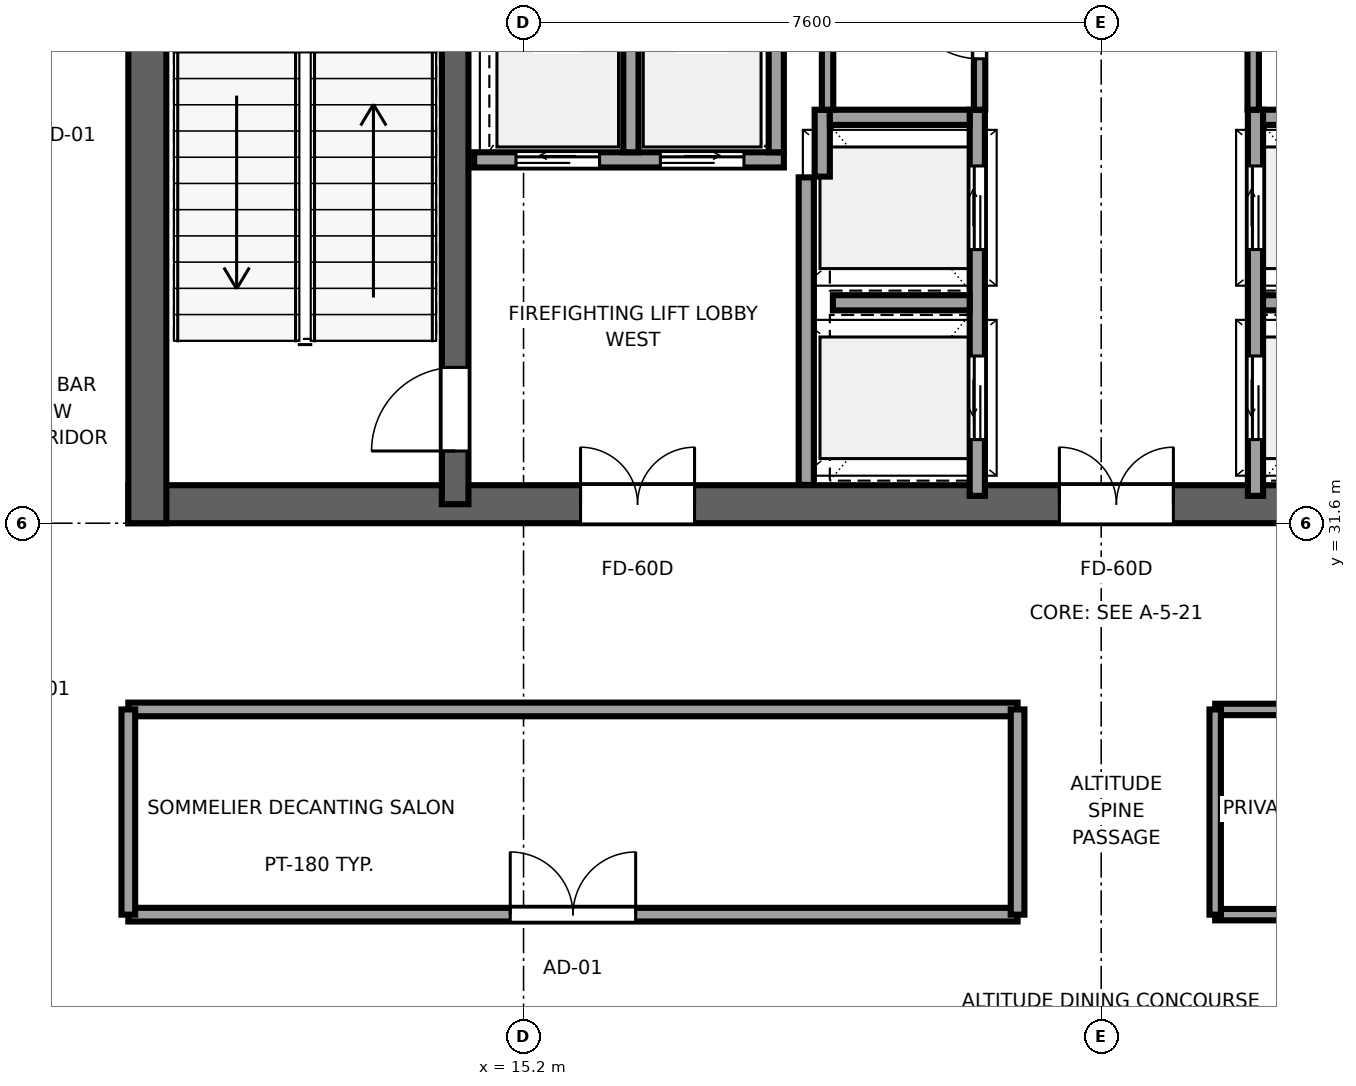
"""IFC4 building model, lengths in metres.
Left out: names, types, materials, properties, quantities, classifications, styles, units other than length and angle.
Written with IfcOpenShell. Run it as: python <this file> out.ifc"""

import sys

from ifc_helpers import new_model, si_unit, direction, frame, frame_2d, origin, place, context, subcontext, project, spatial, rectangle, extrude, source, transform, mapped, element, fill, save


model = new_model("IFC4")
c1 = context("Model", 3, precision=1e-05, world=origin(), true_north=direction((0.0, 1.0)))
c2 = subcontext(c1, "Body", "Model", "MODEL_VIEW")
j1 = project(units=[si_unit("LENGTHUNIT", "METRE"), si_unit("PLANEANGLEUNIT", "RADIAN")], contexts=[c1])
p1 = place(None, origin())
s1 = spatial("IfcSite", under=j1, at=p1, CompositionType="ELEMENT")
p2 = place(p1, origin())
s2 = spatial("IfcBuilding", under=s1, at=p2, CompositionType="ELEMENT")
p3 = place(p2, frame((0.0, 0.0, 286.55)))
s3 = spatial("IfcBuildingStorey", under=s2, at=p3, CompositionType="ELEMENT", Elevation=286.55)
p4 = place(p3, frame((10.0, 31.85, 0.0), z_axis=(0.0, 0.0, 1.0), x_axis=(1.0, 0.0, 0.0)))
e1 = element("IfcWall", 1, at=p4, inside=s3, PredefinedType="SHEAR", context=c2, shape_type="SweptSolid", body=[
    extrude(rectangle(XDim=26.0, YDim=0.5, at=frame_2d((13.0, 0.0))), origin(), (0.0, 0.0, 1.0), 4.4),
])
p5 = place(p4, frame((7.45, 0.0, 0.0), z_axis=(0.0, 0.0, 1.0), x_axis=(-1.0, 0.0, 0.0)))
e2 = element("IfcOpeningElement", 2, at=p5, cuts=e1, PredefinedType="OPENING", context=c2, shape_type="SweptSolid", body=[
    extrude(rectangle(XDim=1.5, YDim=2.04, at=frame_2d((0.75, 1.02))), frame((0.0, 0.26, 0.0), z_axis=(0.0, -1.0, 0.0), x_axis=(1.0, 0.0, 0.0)), (0.0, 0.0, 1.0), 0.52),
])
p6 = place(p4, frame((13.75, 0.0, 0.0), z_axis=(0.0, 0.0, 1.0), x_axis=(-1.0, 0.0, 0.0)))
e3 = element("IfcOpeningElement", 3, at=p6, cuts=e1, PredefinedType="OPENING", context=c2, shape_type="SweptSolid", body=[
    extrude(rectangle(XDim=1.5, YDim=2.04, at=frame_2d((0.75, 1.02))), frame((0.0, 0.26, 0.0), z_axis=(0.0, -1.0, 0.0), x_axis=(1.0, 0.0, 0.0)), (0.0, 0.0, 1.0), 0.52),
])
p7 = place(p4, frame((20.05, 0.0, 0.0), z_axis=(0.0, 0.0, 1.0), x_axis=(-1.0, 0.0, 0.0)))
e4 = element("IfcOpeningElement", 4, at=p7, cuts=e1, PredefinedType="OPENING", context=c2, shape_type="SweptSolid", body=[
    extrude(rectangle(XDim=1.5, YDim=2.04, at=frame_2d((0.75, 1.02))), frame((0.0, 0.26, 0.0), z_axis=(0.0, -1.0, 0.0), x_axis=(1.0, 0.0, 0.0)), (0.0, 0.0, 1.0), 0.52),
])
p8 = place(p3, frame((10.25, 31.6, 0.0), z_axis=(0.0, 0.0, 1.0), x_axis=(0.0, 1.0, 0.0)))
e5 = element("IfcWall", 5, at=p8, inside=s3, PredefinedType="SHEAR", context=c2, shape_type="SweptSolid", body=[
    extrude(rectangle(XDim=13.6, YDim=0.5, at=frame_2d((6.8, 0.0))), origin(), (0.0, 0.0, 1.0), 4.4),
])
p9 = place(p3, frame((14.3, 31.85, 0.0), z_axis=(0.0, 0.0, 1.0), x_axis=(0.0, 1.0, 0.0)))
e6 = element("IfcWall", 6, at=p9, inside=s3, PredefinedType="SHEAR", context=c2, shape_type="SweptSolid", body=[
    extrude(rectangle(XDim=13.1, YDim=0.35, at=frame_2d((6.55, 0.0))), origin(), (0.0, 0.0, 1.0), 4.4),
])
p10 = place(p9, frame((0.7, 0.0, 0.0)))
e7 = element("IfcOpeningElement", 7, at=p10, cuts=e6, PredefinedType="OPENING", context=c2, shape_type="SweptSolid", body=[
    extrude(rectangle(XDim=1.1, YDim=2.12, at=frame_2d((0.55, 1.06))), frame((0.0, 0.185, 0.0), z_axis=(0.0, -1.0, 0.0), x_axis=(1.0, 0.0, 0.0)), (0.0, 0.0, 1.0), 0.37),
])
p11 = place(p3, frame((18.92, 32.104, 0.0), z_axis=(0.0, 0.0, 1.0), x_axis=(0.0, 1.0, 0.0)))
e8 = element("IfcWall", 8, at=p11, inside=s3, PredefinedType="SOLIDWALL", context=c2, shape_type="SweptSolid", body=[
    extrude(rectangle(XDim=4.046, YDim=0.2, at=frame_2d((2.023, 0.0))), origin(), (0.0, 0.0, 1.0), 4.14),
])
p12 = place(p3, frame((21.17, 31.96, 0.0), z_axis=(0.0, 0.0, 1.0), x_axis=(0.0, 1.0, 0.0)))
e9 = element("IfcWall", 9, at=p12, inside=s3, PredefinedType="SOLIDWALL", context=c2, shape_type="SweptSolid", body=[
    extrude(rectangle(XDim=5.08, YDim=0.2, at=frame_2d((2.54, 0.0))), origin(), (0.0, 0.0, 1.0), 4.14),
])
p13 = place(p12, frame((0.74, 0.0, 0.0)))
e10 = element("IfcOpeningElement", 10, at=p13, cuts=e9, PredefinedType="OPENING", context=c2, shape_type="SweptSolid", body=[
    extrude(rectangle(XDim=1.1, YDim=2.12, at=frame_2d((0.55, 1.06))), frame((0.0, 0.11, 0.0), z_axis=(0.0, -1.0, 0.0), x_axis=(1.0, 0.0, 0.0)), (0.0, 0.0, 1.0), 0.22),
])
p14 = place(p12, frame((3.24, 0.0, 0.0)))
e11 = element("IfcOpeningElement", 11, at=p14, cuts=e9, PredefinedType="OPENING", context=c2, shape_type="SweptSolid", body=[
    extrude(rectangle(XDim=1.1, YDim=2.12, at=frame_2d((0.55, 1.06))), frame((0.0, 0.11, 0.0), z_axis=(0.0, -1.0, 0.0), x_axis=(1.0, 0.0, 0.0)), (0.0, 0.0, 1.0), 0.22),
])
p15 = place(p3, frame((19.13, 36.16, 0.0), z_axis=(0.0, 0.0, 1.0), x_axis=(0.0, 1.0, 0.0)))
e12 = element("IfcWall", 12, at=p15, inside=s3, PredefinedType="SOLIDWALL", context=c2, shape_type="SweptSolid", body=[
    extrude(rectangle(XDim=0.88, YDim=0.2, at=frame_2d((0.44, 0.0))), origin(), (0.0, 0.0, 1.0), 4.14),
])
p16 = place(p3, frame((19.23, 36.94, 0.0), z_axis=(0.0, 0.0, 1.0), x_axis=(1.0, 0.0, 0.0)))
e13 = element("IfcWall", 13, at=p16, inside=s3, PredefinedType="SOLIDWALL", context=c2, shape_type="SweptSolid", body=[
    extrude(rectangle(XDim=1.84, YDim=0.2, at=frame_2d((0.92, 0.0))), origin(), (0.0, 0.0, 1.0), 4.14),
])
p17 = place(p3, frame((19.27, 34.5, 0.0), z_axis=(0.0, 0.0, 1.0), x_axis=(1.0, 0.0, 0.0)))
e14 = element("IfcWall", 14, at=p17, inside=s3, PredefinedType="SOLIDWALL", context=c2, shape_type="SweptSolid", body=[
    extrude(rectangle(XDim=1.8, YDim=0.2, at=frame_2d((0.9, 0.0))), origin(), (0.0, 0.0, 1.0), 4.14),
])
p18 = place(p3, frame((14.55, 36.38, 0.0), z_axis=(0.0, 0.0, 1.0), x_axis=(1.0, 0.0, 0.0)))
e15 = element("IfcWall", 15, at=p18, inside=s3, PredefinedType="SOLIDWALL", context=c2, shape_type="SweptSolid", body=[
    extrude(rectangle(XDim=4.075, YDim=0.2, at=frame_2d((2.038, 0.0))), origin(), (0.0, 0.0, 1.0), 4.14),
])
p19 = place(p18, frame((0.55, 0.0, 0.0)))
e16 = element("IfcOpeningElement", 16, at=p19, cuts=e15, PredefinedType="OPENING", context=c2, shape_type="SweptSolid", body=[
    extrude(rectangle(XDim=1.1, YDim=2.12, at=frame_2d((0.55, 1.06))), frame((0.0, 0.11, 0.0), z_axis=(0.0, -1.0, 0.0), x_axis=(1.0, 0.0, 0.0)), (0.0, 0.0, 1.0), 0.22),
])
p20 = place(p18, frame((2.45, 0.0, 0.0)))
e17 = element("IfcOpeningElement", 17, at=p20, cuts=e15, PredefinedType="OPENING", context=c2, shape_type="SweptSolid", body=[
    extrude(rectangle(XDim=1.1, YDim=2.12, at=frame_2d((0.55, 1.06))), frame((0.0, 0.11, 0.0), z_axis=(0.0, -1.0, 0.0), x_axis=(1.0, 0.0, 0.0)), (0.0, 0.0, 1.0), 0.22),
])
for number, where, z_axis, x_axis in (
    (18, (18.525, 36.48, 0.0), (0.0, 0.0, 1.0), (0.0, 1.0, 0.0)),
    (19, (16.613, 36.48, 0.0), (0.0, 0.0, 1.0), (0.0, 1.0, 0.0)),
):
    element("IfcWall", number, at=place(p3, frame(where, z_axis=z_axis, x_axis=x_axis)), inside=s3, PredefinedType="SOLIDWALL", context=c2, shape_type="SweptSolid", body=[
        extrude(rectangle(XDim=2.54, YDim=0.2, at=frame_2d((1.27, 0.0))), origin(), (0.0, 0.0, 1.0), 4.14),
    ])
p21 = place(p3, frame((24.83, 31.96, 0.0), z_axis=(0.0, 0.0, 1.0), x_axis=(0.0, 1.0, 0.0)))
e20 = element("IfcWall", 20, at=p21, inside=s3, PredefinedType="SOLIDWALL", context=c2, shape_type="SweptSolid", body=[
    extrude(rectangle(XDim=5.08, YDim=0.2, at=frame_2d((2.54, 0.0))), origin(), (0.0, 0.0, 1.0), 4.14),
])
p22 = place(p21, frame((0.74, 0.0, 0.0)))
e21 = element("IfcOpeningElement", 21, at=p22, cuts=e20, PredefinedType="OPENING", context=c2, shape_type="SweptSolid", body=[
    extrude(rectangle(XDim=1.1, YDim=2.12, at=frame_2d((0.55, 1.06))), frame((0.0, 0.11, 0.0), z_axis=(0.0, -1.0, 0.0), x_axis=(1.0, 0.0, 0.0)), (0.0, 0.0, 1.0), 0.22),
])
p23 = place(p21, frame((3.24, 0.0, 0.0)))
e22 = element("IfcOpeningElement", 22, at=p23, cuts=e20, PredefinedType="OPENING", context=c2, shape_type="SweptSolid", body=[
    extrude(rectangle(XDim=1.1, YDim=2.12, at=frame_2d((0.55, 1.06))), frame((0.0, 0.11, 0.0), z_axis=(0.0, -1.0, 0.0), x_axis=(1.0, 0.0, 0.0)), (0.0, 0.0, 1.0), 0.22),
])
p24 = place(p3, frame((24.93, 36.94, 0.0), z_axis=(0.0, 0.0, 1.0), x_axis=(1.0, 0.0, 0.0)))
e23 = element("IfcWall", 23, at=p24, inside=s3, PredefinedType="SOLIDWALL", context=c2, shape_type="SweptSolid", body=[
    extrude(rectangle(XDim=1.84, YDim=0.2, at=frame_2d((0.92, 0.0))), origin(), (0.0, 0.0, 1.0), 4.14),
])
p25 = place(p3, frame((24.93, 34.5, 0.0), z_axis=(0.0, 0.0, 1.0), x_axis=(1.0, 0.0, 0.0)))
e24 = element("IfcWall", 24, at=p25, inside=s3, PredefinedType="SOLIDWALL", context=c2, shape_type="SweptSolid", body=[
    extrude(rectangle(XDim=1.8, YDim=0.2, at=frame_2d((0.9, 0.0))), origin(), (0.0, 0.0, 1.0), 4.14),
])
p26 = place(p3, frame((19.2, 37.04, 0.0), z_axis=(0.0, 0.0, 1.0), x_axis=(0.0, 1.0, 0.0)))
e25 = element("IfcWall", 25, at=p26, inside=s3, PredefinedType="PARTITIONING", context=c2, shape_type="SweptSolid", body=[
    extrude(rectangle(XDim=2.36, YDim=0.15, at=frame_2d((1.18, 0.0))), origin(), (0.0, 0.0, 1.0), 4.14),
])
p27 = place(p3, frame((21.2, 37.04, 0.0), z_axis=(0.0, 0.0, 1.0), x_axis=(0.0, 1.0, 0.0)))
e26 = element("IfcWall", 26, at=p27, inside=s3, PredefinedType="PARTITIONING", context=c2, shape_type="SweptSolid", body=[
    extrude(rectangle(XDim=2.36, YDim=0.15, at=frame_2d((1.18, 0.0))), origin(), (0.0, 0.0, 1.0), 4.14),
])
p28 = place(p27, frame((0.67, 0.0, 0.0)))
e27 = element("IfcOpeningElement", 27, at=p28, cuts=e26, PredefinedType="OPENING", context=c2, shape_type="SweptSolid", body=[
    extrude(rectangle(XDim=1.02, YDim=2.03, at=frame_2d((0.51, 1.015))), frame((0.0, 0.085, 0.0), z_axis=(0.0, -1.0, 0.0), x_axis=(1.0, 0.0, 0.0)), (0.0, 0.0, 1.0), 0.17),
])
p29 = place(p3, frame((24.8, 37.04, 0.0), z_axis=(0.0, 0.0, 1.0), x_axis=(0.0, 1.0, 0.0)))
e28 = element("IfcWall", 28, at=p29, inside=s3, PredefinedType="PARTITIONING", context=c2, shape_type="SweptSolid", body=[
    extrude(rectangle(XDim=4.86, YDim=0.15, at=frame_2d((2.43, 0.0))), origin(), (0.0, 0.0, 1.0), 4.14),
])
p30 = place(p29, frame((2.02, 0.0, 0.0)))
e29 = element("IfcOpeningElement", 29, at=p30, cuts=e28, PredefinedType="OPENING", context=c2, shape_type="SweptSolid", body=[
    extrude(rectangle(XDim=0.82, YDim=2.01, at=frame_2d((0.41, 1.005))), frame((0.0, 0.085, 0.0), z_axis=(0.0, -1.0, 0.0), x_axis=(1.0, 0.0, 0.0)), (0.0, 0.0, 1.0), 0.17),
])
p31 = place(p3, frame((10.0, 26.45, 0.0), z_axis=(0.0, 0.0, 1.0), x_axis=(1.0, 0.0, 0.0)))
e30 = element("IfcWall", 30, at=p31, inside=s3, PredefinedType="PARTITIONING", context=c2, shape_type="SweptSolid", body=[
    extrude(rectangle(XDim=11.7, YDim=0.18, at=frame_2d((5.85, 0.0))), origin(), (0.0, 0.0, 1.0), 4.14),
])
p32 = place(p31, frame((5.025, 0.0, 0.0)))
e31 = element("IfcOpeningElement", 31, at=p32, cuts=e30, PredefinedType="OPENING", context=c2, shape_type="SweptSolid", body=[
    extrude(rectangle(XDim=1.65, YDim=2.15, at=frame_2d((0.825, 1.075))), frame((0.0, 0.1, 0.0), z_axis=(0.0, -1.0, 0.0), x_axis=(1.0, 0.0, 0.0)), (0.0, 0.0, 1.0), 0.2),
])
p33 = place(p3, frame((10.0, 29.15, 0.0), z_axis=(0.0, 0.0, 1.0), x_axis=(1.0, 0.0, 0.0)))
e32 = element("IfcWall", 32, at=p33, inside=s3, PredefinedType="PARTITIONING", context=c2, shape_type="SweptSolid", body=[
    extrude(rectangle(XDim=11.7, YDim=0.18, at=frame_2d((5.85, 0.0))), origin(), (0.0, 0.0, 1.0), 4.14),
])
for number, where, z_axis, x_axis in (
    (33, (10.0, 26.45, 0.0), (0.0, 0.0, 1.0), (0.0, 1.0, 0.0)),
    (34, (21.7, 26.45, 0.0), (0.0, 0.0, 1.0), (0.0, 1.0, 0.0)),
):
    element("IfcWall", number, at=place(p3, frame(where, z_axis=z_axis, x_axis=x_axis)), inside=s3, PredefinedType="PARTITIONING", context=c2, shape_type="SweptSolid", body=[
        extrude(rectangle(XDim=2.7, YDim=0.18, at=frame_2d((1.35, 0.0))), origin(), (0.0, 0.0, 1.0), 4.14),
    ])
p34 = place(p3, frame((24.3, 26.45, 0.0), z_axis=(0.0, 0.0, 1.0), x_axis=(1.0, 0.0, 0.0)))
e35 = element("IfcWall", 35, at=p34, inside=s3, PredefinedType="PARTITIONING", context=c2, shape_type="SweptSolid", body=[
    extrude(rectangle(XDim=11.55, YDim=0.15, at=frame_2d((5.775, 0.0))), origin(), (0.0, 0.0, 1.0), 4.14),
])
p35 = place(p34, frame((4.95, 0.0, 0.0)))
e36 = element("IfcOpeningElement", 36, at=p35, cuts=e35, PredefinedType="OPENING", context=c2, shape_type="SweptSolid", body=[
    extrude(rectangle(XDim=1.65, YDim=2.15, at=frame_2d((0.825, 1.075))), frame((0.0, 0.085, 0.0), z_axis=(0.0, -1.0, 0.0), x_axis=(1.0, 0.0, 0.0)), (0.0, 0.0, 1.0), 0.17),
])
p36 = place(p3, frame((24.3, 29.15, 0.0), z_axis=(0.0, 0.0, 1.0), x_axis=(1.0, 0.0, 0.0)))
e37 = element("IfcWall", 37, at=p36, inside=s3, PredefinedType="PARTITIONING", context=c2, shape_type="SweptSolid", body=[
    extrude(rectangle(XDim=11.55, YDim=0.15, at=frame_2d((5.775, 0.0))), origin(), (0.0, 0.0, 1.0), 4.14),
])
p37 = place(p3, frame((24.3, 26.45, 0.0), z_axis=(0.0, 0.0, 1.0), x_axis=(0.0, 1.0, 0.0)))
e38 = element("IfcWall", 38, at=p37, inside=s3, PredefinedType="PARTITIONING", context=c2, shape_type="SweptSolid", body=[
    extrude(rectangle(XDim=2.7, YDim=0.15, at=frame_2d((1.35, 0.0))), origin(), (0.0, 0.0, 1.0), 4.14),
])
m1 = source(origin(), c2, "Body", "SweptSolid", [
    extrude(rectangle(XDim=1.1, YDim=2.12, at=frame_2d((0.55, 1.06))), frame((0.0, 0.025, 0.0), z_axis=(0.0, -1.0, 0.0), x_axis=(1.0, 0.0, 0.0)), (0.0, 0.0, 1.0), 0.05),
])
p38 = place(p10, origin())
e39 = element("IfcDoor", 39, at=p38, inside=s3, OperationType="SINGLE_SWING_LEFT", PredefinedType="DOOR", context=c2, shape_type="MappedRepresentation", body=[
    mapped(m1, transform((0.0, 0.0, 0.0), x_axis=(1.0, 0.0, 0.0), y_axis=(0.0, 1.0, 0.0), z_axis=(0.0, 0.0, 1.0), scale=1.0)),
])
fill(e7, e39)
m2 = source(origin(), c2, "Body", "SweptSolid", [
    extrude(rectangle(XDim=1.5, YDim=2.04, at=frame_2d((0.75, 1.02))), frame((0.0, 0.025, 0.0), z_axis=(0.0, -1.0, 0.0), x_axis=(1.0, 0.0, 0.0)), (0.0, 0.0, 1.0), 0.05),
])
p39 = place(p5, origin())
e40 = element("IfcDoor", 40, at=p39, inside=s3, OperationType="DOUBLE_DOOR_SINGLE_SWING", PredefinedType="DOOR", context=c2, shape_type="MappedRepresentation", body=[
    mapped(m2, transform((0.0, 0.0, 0.0), x_axis=(1.0, 0.0, 0.0), y_axis=(0.0, 1.0, 0.0), z_axis=(0.0, 0.0, 1.0), scale=1.0)),
])
fill(e2, e40)
p40 = place(p6, origin())
e41 = element("IfcDoor", 41, at=p40, inside=s3, OperationType="DOUBLE_DOOR_SINGLE_SWING", PredefinedType="DOOR", context=c2, shape_type="MappedRepresentation", body=[
    mapped(m2, transform((0.0, 0.0, 0.0), x_axis=(1.0, 0.0, 0.0), y_axis=(0.0, 1.0, 0.0), z_axis=(0.0, 0.0, 1.0), scale=1.0)),
])
fill(e3, e41)
m3 = source(origin(), c2, "Body", "SweptSolid", [
    extrude(rectangle(XDim=1.1, YDim=2.12, at=frame_2d((0.55, 1.06))), frame((0.0, 0.025, 0.0), z_axis=(0.0, -1.0, 0.0), x_axis=(1.0, 0.0, 0.0)), (0.0, 0.0, 1.0), 0.05),
])
p41 = place(p13, origin())
e42 = element("IfcDoor", 42, at=p41, inside=s3, OperationType="SLIDING_TO_LEFT", PredefinedType="DOOR", context=c2, shape_type="MappedRepresentation", body=[
    mapped(m3, transform((0.0, 0.0, 0.0), x_axis=(1.0, 0.0, 0.0), y_axis=(0.0, 1.0, 0.0), z_axis=(0.0, 0.0, 1.0), scale=1.0)),
])
fill(e10, e42)
p42 = place(p14, origin())
e43 = element("IfcDoor", 43, at=p42, inside=s3, OperationType="SLIDING_TO_RIGHT", PredefinedType="DOOR", context=c2, shape_type="MappedRepresentation", body=[
    mapped(m3, transform((0.0, 0.0, 0.0), x_axis=(1.0, 0.0, 0.0), y_axis=(0.0, 1.0, 0.0), z_axis=(0.0, 0.0, 1.0), scale=1.0)),
])
fill(e11, e43)
p43 = place(p19, origin())
e44 = element("IfcDoor", 44, at=p43, inside=s3, OperationType="SLIDING_TO_LEFT", PredefinedType="DOOR", context=c2, shape_type="MappedRepresentation", body=[
    mapped(m3, transform((0.0, 0.0, 0.0), x_axis=(1.0, 0.0, 0.0), y_axis=(0.0, 1.0, 0.0), z_axis=(0.0, 0.0, 1.0), scale=1.0)),
])
fill(e16, e44)
p44 = place(p20, origin())
e45 = element("IfcDoor", 45, at=p44, inside=s3, OperationType="SLIDING_TO_RIGHT", PredefinedType="DOOR", context=c2, shape_type="MappedRepresentation", body=[
    mapped(m3, transform((0.0, 0.0, 0.0), x_axis=(1.0, 0.0, 0.0), y_axis=(0.0, 1.0, 0.0), z_axis=(0.0, 0.0, 1.0), scale=1.0)),
])
fill(e17, e45)
p45 = place(p22, origin())
e46 = element("IfcDoor", 46, at=p45, inside=s3, OperationType="SLIDING_TO_LEFT", PredefinedType="DOOR", context=c2, shape_type="MappedRepresentation", body=[
    mapped(m3, transform((0.0, 0.0, 0.0), x_axis=(1.0, 0.0, 0.0), y_axis=(0.0, 1.0, 0.0), z_axis=(0.0, 0.0, 1.0), scale=1.0)),
])
fill(e21, e46)
p46 = place(p23, origin())
e47 = element("IfcDoor", 47, at=p46, inside=s3, OperationType="SLIDING_TO_RIGHT", PredefinedType="DOOR", context=c2, shape_type="MappedRepresentation", body=[
    mapped(m3, transform((0.0, 0.0, 0.0), x_axis=(1.0, 0.0, 0.0), y_axis=(0.0, 1.0, 0.0), z_axis=(0.0, 0.0, 1.0), scale=1.0)),
])
fill(e22, e47)
m4 = source(origin(), c2, "Body", "SweptSolid", [
    extrude(rectangle(XDim=1.02, YDim=2.03, at=frame_2d((0.51, 1.015))), frame((0.0, 0.025, 0.0), z_axis=(0.0, -1.0, 0.0), x_axis=(1.0, 0.0, 0.0)), (0.0, 0.0, 1.0), 0.05),
])
p47 = place(p28, origin())
e48 = element("IfcDoor", 48, at=p47, inside=s3, OperationType="SINGLE_SWING_RIGHT", PredefinedType="DOOR", context=c2, shape_type="MappedRepresentation", body=[
    mapped(m4, transform((0.0, 0.0, 0.0), x_axis=(1.0, 0.0, 0.0), y_axis=(0.0, 1.0, 0.0), z_axis=(0.0, 0.0, 1.0), scale=1.0)),
])
fill(e27, e48)
m5 = source(origin(), c2, "Body", "SweptSolid", [
    extrude(rectangle(XDim=1.65, YDim=2.15, at=frame_2d((0.825, 1.075))), frame((0.0, 0.025, 0.0), z_axis=(0.0, -1.0, 0.0), x_axis=(1.0, 0.0, 0.0)), (0.0, 0.0, 1.0), 0.05),
])
p48 = place(p32, origin())
e49 = element("IfcDoor", 49, at=p48, inside=s3, OperationType="DOUBLE_DOOR_SINGLE_SWING", PredefinedType="DOOR", context=c2, shape_type="MappedRepresentation", body=[
    mapped(m5, transform((0.0, 0.0, 0.0), x_axis=(1.0, 0.0, 0.0), y_axis=(0.0, 1.0, 0.0), z_axis=(0.0, 0.0, 1.0), scale=1.0)),
])
fill(e31, e49)
save(model, sys.argv[1])
